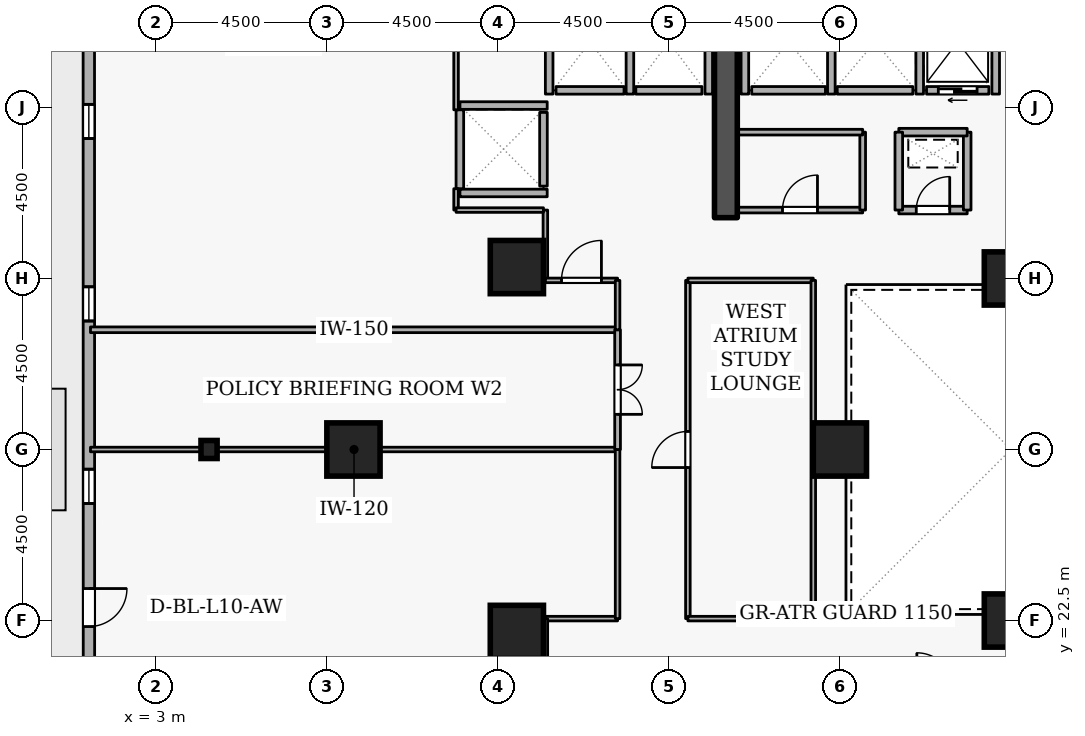
"""IFC4 building model, lengths in metres.
Left out: names, types, materials, properties, quantities, classifications, styles, units other than length and angle.
Written with IfcOpenShell. Run it as: python <this file> out.ifc"""

import sys

from ifc_helpers import new_model, si_unit, direction, frame, frame_2d, origin, origin_2d, place, context, subcontext, project, spatial, rectangle, i_section, extrude, element, fill, save


model = new_model("IFC4")
c1 = context("Model", 3, precision=1e-05, world=origin(), true_north=direction((0.0, 1.0)))
c2 = subcontext(c1, "Body", "Model", "MODEL_VIEW")
j1 = project(units=[si_unit("LENGTHUNIT", "METRE"), si_unit("PLANEANGLEUNIT", "RADIAN")], contexts=[c1])
p1 = place(None, origin())
s1 = spatial("IfcSite", under=j1, at=p1, CompositionType="ELEMENT")
p2 = place(p1, origin())
s2 = spatial("IfcBuilding", under=s1, at=p2, CompositionType="ELEMENT")
p3 = place(p2, frame((0.0, 0.0, 42.3)))
s3 = spatial("IfcBuildingStorey", under=s2, at=p3, CompositionType="ELEMENT", Elevation=42.3)
p4 = place(p3, frame((18.0, 33.1, 0.0), z_axis=(0.0, 0.0, 1.0), x_axis=(0.0, 1.0, 0.0)))
e1 = element("IfcWall", 1, at=p4, inside=s3, PredefinedType="SHEAR", context=c2, shape_type="SweptSolid", body=[
    extrude(rectangle(XDim=5.7, YDim=0.6, at=frame_2d((2.85, 0.0))), origin(), (0.0, 0.0, 1.0), 3.6),
])
for number, where, z_axis, x_axis in (
    (2, (8.2, 27.0, 0.0), (0.0, 0.0, 1.0), (1.0, 0.0, 0.0)),
    (3, (12.5, 22.2, 0.0), (0.0, 0.0, 1.0), (1.0, 0.0, 0.0)),
    (4, (12.5, 31.8, 0.0), (0.0, 0.0, 1.0), (1.0, 0.0, 0.0)),
    (5, (25.5, 22.5, 0.0), (0.0, 0.0, 1.0), (1.0, 0.0, 0.0)),
    (6, (25.5, 31.5, 0.0), (0.0, 0.0, 1.0), (1.0, 0.0, 0.0)),
    (7, (21.0, 27.0, 0.0), (0.0, 0.0, 1.0), (1.0, 0.0, 0.0)),
):
    element("IfcColumn", number, at=place(p3, frame(where, z_axis=z_axis, x_axis=x_axis)), inside=s3, PredefinedType="COLUMN", context=c2, shape_type="SweptSolid", body=[
        extrude(rectangle(XDim=1.4, YDim=1.4, at=origin_2d()), origin(), (0.0, 0.0, 1.0), 3.6),
    ])
p5 = place(p3, frame((4.4, 27.0, 0.0), z_axis=(0.0, 0.0, 1.0), x_axis=(1.0, 0.0, 0.0)))
e8 = element("IfcColumn", 8, at=p5, inside=s3, PredefinedType="COLUMN", context=c2, shape_type="SweptSolid", body=[
    extrude(i_section(OverallWidth=0.424, OverallDepth=0.475, WebThickness=0.048, FlangeThickness=0.077, FilletRadius=0.015, at=origin_2d()), origin(), (0.0, 0.0, 1.0), 3.6),
])
p6 = place(p3, frame((1.235, 42.681, 0.0), z_axis=(0.0, 0.0, 1.0), x_axis=(0.000208784245, -0.999999978205, 0.0)))
e9 = element("IfcWall", 9, at=p6, inside=s3, PredefinedType="STANDARD", context=c2, shape_type="SweptSolid", body=[
    extrude(rectangle(XDim=35.08, YDim=0.3, at=frame_2d((17.54, 0.0))), origin(), (0.0, 0.0, 1.0), 2.7),
])
p7 = place(p6, frame((19.34, 0.0, 0.0)))
e10 = element("IfcOpeningElement", 10, at=p7, cuts=e9, PredefinedType="OPENING", context=c2, shape_type="SweptSolid", body=[
    extrude(rectangle(XDim=1.0, YDim=2.08, at=frame_2d((0.5, 1.04))), frame((0.0, 0.16, 0.0), z_axis=(0.0, -1.0, 0.0), x_axis=(1.0, 0.0, 0.0)), (0.0, 0.0, 1.0), 0.32),
])
p8 = place(p6, frame((1.8, 0.0, 0.72)))
e11 = element("IfcOpeningElement", 11, at=p8, cuts=e9, PredefinedType="OPENING", context=c2, shape_type="SweptSolid", body=[
    extrude(rectangle(XDim=0.9, YDim=1.75, at=frame_2d((0.45, 0.875))), frame((0.0, 0.16, 0.0), z_axis=(0.0, -1.0, 0.0), x_axis=(1.0, 0.0, 0.0)), (0.0, 0.0, 1.0), 0.32),
])
p9 = place(p6, frame((6.6, 0.0, 0.72)))
e12 = element("IfcOpeningElement", 12, at=p9, cuts=e9, PredefinedType="OPENING", context=c2, shape_type="SweptSolid", body=[
    extrude(rectangle(XDim=0.9, YDim=1.75, at=frame_2d((0.45, 0.875))), frame((0.0, 0.16, 0.0), z_axis=(0.0, -1.0, 0.0), x_axis=(1.0, 0.0, 0.0)), (0.0, 0.0, 1.0), 0.32),
])
p10 = place(p6, frame((11.4, 0.0, 0.72)))
e13 = element("IfcOpeningElement", 13, at=p10, cuts=e9, PredefinedType="OPENING", context=c2, shape_type="SweptSolid", body=[
    extrude(rectangle(XDim=0.9, YDim=1.75, at=frame_2d((0.45, 0.875))), frame((0.0, 0.16, 0.0), z_axis=(0.0, -1.0, 0.0), x_axis=(1.0, 0.0, 0.0)), (0.0, 0.0, 1.0), 0.32),
])
p11 = place(p6, frame((16.2, 0.0, 0.72)))
e14 = element("IfcOpeningElement", 14, at=p11, cuts=e9, PredefinedType="OPENING", context=c2, shape_type="SweptSolid", body=[
    extrude(rectangle(XDim=0.9, YDim=1.75, at=frame_2d((0.45, 0.875))), frame((0.0, 0.16, 0.0), z_axis=(0.0, -1.0, 0.0), x_axis=(1.0, 0.0, 0.0)), (0.0, 0.0, 1.0), 0.32),
])
p12 = place(p6, frame((25.8, 0.0, 0.72)))
e15 = element("IfcOpeningElement", 15, at=p12, cuts=e9, PredefinedType="OPENING", context=c2, shape_type="SweptSolid", body=[
    extrude(rectangle(XDim=0.9, YDim=1.75, at=frame_2d((0.45, 0.875))), frame((0.0, 0.16, 0.0), z_axis=(0.0, -1.0, 0.0), x_axis=(1.0, 0.0, 0.0)), (0.0, 0.0, 1.0), 0.32),
])
p13 = place(p3, frame((24.92, 36.45, 0.0), z_axis=(0.0, 0.0, 1.0), x_axis=(-1.0, 0.0, 0.0)))
e16 = element("IfcWall", 16, at=p13, inside=s3, PredefinedType="STANDARD", context=c2, shape_type="SweptSolid", body=[
    extrude(rectangle(XDim=1.64, YDim=0.2, at=frame_2d((0.82, 0.0))), origin(), (0.0, 0.0, 1.0), 3.34),
])
p14 = place(p13, frame((0.31, 0.0, 0.0)))
e17 = element("IfcOpeningElement", 17, at=p14, cuts=e16, PredefinedType="OPENING", context=c2, shape_type="SweptSolid", body=[
    extrude(rectangle(XDim=1.02, YDim=2.06, at=frame_2d((0.51, 1.03))), frame((0.0, 0.11, 0.0), z_axis=(0.0, -1.0, 0.0), x_axis=(1.0, 0.0, 0.0)), (0.0, 0.0, 1.0), 0.22),
])
p15 = place(p3, frame((22.92, 36.45, 0.0), z_axis=(0.0, 0.0, 1.0), x_axis=(-1.0, 0.0, 0.0)))
e18 = element("IfcWall", 18, at=p15, inside=s3, PredefinedType="STANDARD", context=c2, shape_type="SweptSolid", body=[
    extrude(rectangle(XDim=1.99, YDim=0.2, at=frame_2d((0.995, 0.0))), origin(), (0.0, 0.0, 1.0), 3.34),
])
p16 = place(p3, frame((20.62, 36.45, 0.0), z_axis=(0.0, 0.0, 1.0), x_axis=(-1.0, 0.0, 0.0)))
e19 = element("IfcWall", 19, at=p16, inside=s3, PredefinedType="STANDARD", context=c2, shape_type="SweptSolid", body=[
    extrude(rectangle(XDim=1.94, YDim=0.2, at=frame_2d((0.97, 0.0))), origin(), (0.0, 0.0, 1.0), 3.34),
])
p17 = place(p3, frame((17.37, 36.45, 0.0), z_axis=(0.0, 0.0, 1.0), x_axis=(-1.0, 0.0, 0.0)))
e20 = element("IfcWall", 20, at=p17, inside=s3, PredefinedType="STANDARD", context=c2, shape_type="SweptSolid", body=[
    extrude(rectangle(XDim=1.74, YDim=0.2, at=frame_2d((0.87, 0.0))), origin(), (0.0, 0.0, 1.0), 3.34),
])
p18 = place(p3, frame((15.32, 36.45, 0.0), z_axis=(0.0, 0.0, 1.0), x_axis=(-1.0, 0.0, 0.0)))
e21 = element("IfcWall", 21, at=p18, inside=s3, PredefinedType="STANDARD", context=c2, shape_type="SweptSolid", body=[
    extrude(rectangle(XDim=1.79, YDim=0.2, at=frame_2d((0.895, 0.0))), origin(), (0.0, 0.0, 1.0), 3.34),
])
p19 = place(p3, frame((13.2, 33.93, 0.0), z_axis=(0.0, 0.0, 1.0), x_axis=(0.0, 1.0, 0.0)))
e22 = element("IfcWall", 22, at=p19, inside=s3, PredefinedType="STANDARD", context=c2, shape_type="SweptSolid", body=[
    extrude(rectangle(XDim=1.94, YDim=0.2, at=frame_2d((0.97, 0.0))), origin(), (0.0, 0.0, 1.0), 3.34),
])
for number, where, z_axis, x_axis in (
    (23, (25.1, 36.352, 0.0), (0.0, 0.0, 1.0), (0.0, 1.0, 0.0)),
    (24, (23.1, 36.352, 0.0), (0.0, 0.0, 1.0), (0.0, 1.0, 0.0)),
    (25, (20.775, 36.352, 0.0), (0.0, 0.0, 1.0), (0.0, 1.0, 0.0)),
    (26, (18.5, 36.352, 0.0), (0.0, 0.0, 1.0), (0.0, 1.0, 0.0)),
):
    element("IfcWall", number, at=place(p3, frame(where, z_axis=z_axis, x_axis=x_axis)), inside=s3, PredefinedType="STANDARD", context=c2, shape_type="SweptSolid", body=[
        extrude(rectangle(XDim=2.436, YDim=0.2, at=frame_2d((1.218, 0.0))), origin(), (0.0, 0.0, 1.0), 3.34),
    ])
p20 = place(p3, frame((17.55, 36.352, 0.0), z_axis=(0.0, 0.0, 1.0), x_axis=(0.0, 1.0, 0.0)))
e27 = element("IfcWall", 27, at=p20, inside=s3, PredefinedType="STANDARD", context=c2, shape_type="SweptSolid", body=[
    extrude(rectangle(XDim=2.636, YDim=0.2, at=frame_2d((1.318, 0.0))), origin(), (0.0, 0.0, 1.0), 2.545),
])
for number, where, z_axis, x_axis in (
    (28, (15.475, 36.352, 0.0), (0.0, 0.0, 1.0), (0.0, 1.0, 0.0)),
    (29, (13.35, 36.352, 0.0), (0.0, 0.0, 1.0), (0.0, 1.0, 0.0)),
):
    element("IfcWall", number, at=place(p3, frame(where, z_axis=z_axis, x_axis=x_axis)), inside=s3, PredefinedType="STANDARD", context=c2, shape_type="SweptSolid", body=[
        extrude(rectangle(XDim=2.636, YDim=0.2, at=frame_2d((1.318, 0.0))), origin(), (0.0, 0.0, 1.0), 3.34),
    ])
for number, where, z_axis, x_axis in (
    (30, (11.002, 36.05, 0.0), (0.0, 0.0, 1.0), (1.0, 0.0, 0.0)),
    (31, (11.002, 33.75, 0.0), (0.0, 0.0, 1.0), (1.0, 0.0, 0.0)),
):
    element("IfcWall", number, at=place(p3, frame(where, z_axis=z_axis, x_axis=x_axis)), inside=s3, PredefinedType="STANDARD", context=c2, shape_type="SweptSolid", body=[
        extrude(rectangle(XDim=2.296, YDim=0.2, at=frame_2d((1.148, 0.0))), origin(), (0.0, 0.0, 1.0), 3.34),
    ])
p21 = place(p3, frame((11.0, 33.862, 0.0), z_axis=(0.0, 0.0, 1.0), x_axis=(0.0, 1.0, 0.0)))
e32 = element("IfcWall", 32, at=p21, inside=s3, PredefinedType="STANDARD", context=c2, shape_type="SweptSolid", body=[
    extrude(rectangle(XDim=2.076, YDim=0.2, at=frame_2d((1.038, 0.0))), origin(), (0.0, 0.0, 1.0), 3.34),
])
p22 = place(p3, frame((22.55, 33.3, 0.0), z_axis=(0.0, 0.0, 1.0), x_axis=(1.0, 0.0, 0.0)))
e33 = element("IfcWall", 33, at=p22, inside=s3, PredefinedType="STANDARD", context=c2, shape_type="SweptSolid", body=[
    extrude(rectangle(XDim=1.8, YDim=0.2, at=frame_2d((0.9, 0.0))), origin(), (0.0, 0.0, 1.0), 3.34),
])
p23 = place(p22, frame((0.46, 0.0, 0.0)))
e34 = element("IfcOpeningElement", 34, at=p23, cuts=e33, PredefinedType="OPENING", context=c2, shape_type="SweptSolid", body=[
    extrude(rectangle(XDim=0.88, YDim=2.04, at=frame_2d((0.44, 1.02))), frame((0.0, 0.11, 0.0), z_axis=(0.0, -1.0, 0.0), x_axis=(1.0, 0.0, 0.0)), (0.0, 0.0, 1.0), 0.22),
])
p24 = place(p3, frame((24.35, 33.3, 0.0), z_axis=(0.0, 0.0, 1.0), x_axis=(0.0, 1.0, 0.0)))
e35 = element("IfcWall", 35, at=p24, inside=s3, PredefinedType="STANDARD", context=c2, shape_type="SweptSolid", body=[
    extrude(rectangle(XDim=2.05, YDim=0.2, at=frame_2d((1.025, 0.0))), origin(), (0.0, 0.0, 1.0), 3.34),
])
p25 = place(p3, frame((24.35, 35.35, 0.0), z_axis=(0.0, 0.0, 1.0), x_axis=(-1.0, 0.0, 0.0)))
e36 = element("IfcWall", 36, at=p25, inside=s3, PredefinedType="STANDARD", context=c2, shape_type="SweptSolid", body=[
    extrude(rectangle(XDim=1.8, YDim=0.2, at=frame_2d((0.9, 0.0))), origin(), (0.0, 0.0, 1.0), 3.34),
])
p26 = place(p3, frame((22.55, 35.35, 0.0), z_axis=(0.0, 0.0, 1.0), x_axis=(0.0, -1.0, 0.0)))
e37 = element("IfcWall", 37, at=p26, inside=s3, PredefinedType="STANDARD", context=c2, shape_type="SweptSolid", body=[
    extrude(rectangle(XDim=2.05, YDim=0.2, at=frame_2d((1.025, 0.0))), origin(), (0.0, 0.0, 1.0), 3.34),
])
p27 = place(p3, frame((18.3, 33.3, 0.0), z_axis=(0.0, 0.0, 1.0), x_axis=(1.0, 0.0, 0.0)))
e38 = element("IfcWall", 38, at=p27, inside=s3, PredefinedType="PARTITIONING", context=c2, shape_type="SweptSolid", body=[
    extrude(rectangle(XDim=3.3, YDim=0.15, at=frame_2d((1.65, 0.0))), origin(), (0.0, 0.0, 1.0), 3.34),
])
p28 = place(p27, frame((1.19, 0.0, 0.0)))
e39 = element("IfcOpeningElement", 39, at=p28, cuts=e38, PredefinedType="OPENING", context=c2, shape_type="SweptSolid", body=[
    extrude(rectangle(XDim=0.92, YDim=2.08, at=frame_2d((0.46, 1.04))), frame((0.0, 0.085, 0.0), z_axis=(0.0, -1.0, 0.0), x_axis=(1.0, 0.0, 0.0)), (0.0, 0.0, 1.0), 0.17),
])
p29 = place(p3, frame((21.6, 33.3, 0.0), z_axis=(0.0, 0.0, 1.0), x_axis=(0.0, 1.0, 0.0)))
e40 = element("IfcWall", 40, at=p29, inside=s3, PredefinedType="PARTITIONING", context=c2, shape_type="SweptSolid", body=[
    extrude(rectangle(XDim=2.05, YDim=0.15, at=frame_2d((1.025, 0.0))), origin(), (0.0, 0.0, 1.0), 3.34),
])
p30 = place(p3, frame((21.6, 35.35, 0.0), z_axis=(0.0, 0.0, 1.0), x_axis=(-1.0, 0.0, 0.0)))
e41 = element("IfcWall", 41, at=p30, inside=s3, PredefinedType="PARTITIONING", context=c2, shape_type="SweptSolid", body=[
    extrude(rectangle(XDim=3.3, YDim=0.15, at=frame_2d((1.65, 0.0))), origin(), (0.0, 0.0, 1.0), 3.34),
])
p31 = place(p3, frame((15.15, 22.55, 0.0), z_axis=(0.0, 0.0, 1.0), x_axis=(-1.0, 0.0, 0.0)))
e42 = element("IfcWall", 42, at=p31, inside=s3, PredefinedType="PARTITIONING", context=c2, shape_type="SweptSolid", body=[
    extrude(rectangle(XDim=1.9, YDim=0.12, at=frame_2d((0.95, 0.0))), origin(), (0.0, 0.0, 1.0), 3.34),
])
p32 = place(p3, frame((13.25, 22.55, 0.0), z_axis=(0.0, 0.0, 1.0), x_axis=(0.0, -1.0, 0.0)))
e43 = element("IfcWall", 43, at=p32, inside=s3, PredefinedType="PARTITIONING", context=c2, shape_type="SweptSolid", body=[
    extrude(rectangle(XDim=1.85, YDim=0.12, at=frame_2d((0.925, 0.0))), origin(), (0.0, 0.0, 1.0), 3.34),
])
p33 = place(p3, frame((1.28, 27.0, 0.0), z_axis=(0.0, 0.0, 1.0), x_axis=(1.0, 0.0, 0.0)))
e44 = element("IfcWall", 44, at=p33, inside=s3, PredefinedType="PARTITIONING", context=c2, shape_type="SweptSolid", body=[
    extrude(rectangle(XDim=13.87, YDim=0.12, at=frame_2d((6.935, 0.0))), origin(), (0.0, 0.0, 1.0), 2.882),
])
p34 = place(p3, frame((15.15, 27.0, 0.0), z_axis=(0.0, 0.0, 1.0), x_axis=(0.0, -1.0, 0.0)))
e45 = element("IfcWall", 45, at=p34, inside=s3, PredefinedType="PARTITIONING", context=c2, shape_type="SweptSolid", body=[
    extrude(rectangle(XDim=4.45, YDim=0.12, at=frame_2d((2.225, 0.0))), origin(), (0.0, 0.0, 1.0), 3.34),
])
p35 = place(p3, frame((1.28, 30.15, 0.0), z_axis=(0.0, 0.0, 1.0), x_axis=(1.0, 0.0, 0.0)))
e46 = element("IfcWall", 46, at=p35, inside=s3, PredefinedType="PARTITIONING", context=c2, shape_type="SweptSolid", body=[
    extrude(rectangle(XDim=13.87, YDim=0.15, at=frame_2d((6.935, 0.0))), origin(), (0.0, 0.0, 1.0), 3.34),
])
p36 = place(p3, frame((15.15, 30.15, 0.0), z_axis=(0.0, 0.0, 1.0), x_axis=(0.0, -1.0, 0.0)))
e47 = element("IfcWall", 47, at=p36, inside=s3, PredefinedType="PARTITIONING", context=c2, shape_type="SweptSolid", body=[
    extrude(rectangle(XDim=3.15, YDim=0.15, at=frame_2d((1.575, 0.0))), origin(), (0.0, 0.0, 1.0), 3.34),
])
p37 = place(p36, frame((0.925, 0.0, 0.0)))
e48 = element("IfcOpeningElement", 48, at=p37, cuts=e47, PredefinedType="OPENING", context=c2, shape_type="SweptSolid", body=[
    extrude(rectangle(XDim=1.3, YDim=2.12, at=frame_2d((0.65, 1.06))), frame((0.0, 0.085, 0.0), z_axis=(0.0, -1.0, 0.0), x_axis=(1.0, 0.0, 0.0)), (0.0, 0.0, 1.0), 0.17),
])
p38 = place(p3, frame((13.25, 33.3, 0.0), z_axis=(0.0, 0.0, 1.0), x_axis=(0.0, -1.0, 0.0)))
e49 = element("IfcWall", 49, at=p38, inside=s3, PredefinedType="PARTITIONING", context=c2, shape_type="SweptSolid", body=[
    extrude(rectangle(XDim=1.85, YDim=0.12, at=frame_2d((0.925, 0.0))), origin(), (0.0, 0.0, 1.0), 3.34),
])
p39 = place(p3, frame((13.25, 31.45, 0.0), z_axis=(0.0, 0.0, 1.0), x_axis=(1.0, 0.0, 0.0)))
e50 = element("IfcWall", 50, at=p39, inside=s3, PredefinedType="PARTITIONING", context=c2, shape_type="SweptSolid", body=[
    extrude(rectangle(XDim=1.9, YDim=0.12, at=frame_2d((0.95, 0.0))), origin(), (0.0, 0.0, 1.0), 3.34),
])
p40 = place(p39, frame((0.425, 0.0, 0.0)))
e51 = element("IfcOpeningElement", 51, at=p40, cuts=e50, PredefinedType="OPENING", context=c2, shape_type="SweptSolid", body=[
    extrude(rectangle(XDim=1.05, YDim=2.1, at=frame_2d((0.525, 1.05))), frame((0.0, 0.07, 0.0), z_axis=(0.0, -1.0, 0.0), x_axis=(1.0, 0.0, 0.0)), (0.0, 0.0, 1.0), 0.14),
])
p41 = place(p3, frame((15.15, 31.45, 0.0), z_axis=(0.0, 0.0, 1.0), x_axis=(0.0, -1.0, 0.0)))
e52 = element("IfcWall", 52, at=p41, inside=s3, PredefinedType="PARTITIONING", context=c2, shape_type="SweptSolid", body=[
    extrude(rectangle(XDim=1.3, YDim=0.12, at=frame_2d((0.65, 0.0))), origin(), (0.0, 0.0, 1.0), 3.34),
])
p42 = place(p3, frame((10.9, 45.22, 0.0), z_axis=(0.0, 0.0, 1.0), x_axis=(0.0, -1.0, 0.0)))
e53 = element("IfcWall", 53, at=p42, inside=s3, PredefinedType="PARTITIONING", context=c2, shape_type="SweptSolid", body=[
    extrude(rectangle(XDim=9.282, YDim=0.12, at=frame_2d((4.641, 0.0))), origin(), (0.0, 0.0, 1.0), 3.34),
])
p43 = place(p3, frame((10.9, 33.862, 0.0), z_axis=(0.0, 0.0, 1.0), x_axis=(0.0, -1.0, 0.0)))
e54 = element("IfcWall", 54, at=p43, inside=s3, PredefinedType="PARTITIONING", context=c2, shape_type="SweptSolid", body=[
    extrude(rectangle(XDim=0.562, YDim=0.12, at=frame_2d((0.281, 0.0))), origin(), (0.0, 0.0, 1.0), 3.34),
])
p44 = place(p3, frame((10.9, 33.3, 0.0), z_axis=(0.0, 0.0, 1.0), x_axis=(1.0, 0.0, 0.0)))
e55 = element("IfcWall", 55, at=p44, inside=s3, PredefinedType="PARTITIONING", context=c2, shape_type="SweptSolid", body=[
    extrude(rectangle(XDim=2.3, YDim=0.12, at=frame_2d((1.15, 0.0))), origin(), (0.0, 0.0, 1.0), 3.34),
])
p45 = place(p3, frame((17.0, 22.55, 0.0), z_axis=(0.0, 0.0, 1.0), x_axis=(0.0, 1.0, 0.0)))
e56 = element("IfcWall", 56, at=p45, inside=s3, PredefinedType="PARTITIONING", context=c2, shape_type="SweptSolid", body=[
    extrude(rectangle(XDim=8.9, YDim=0.12, at=frame_2d((4.45, 0.0))), origin(), (0.0, 0.0, 1.0), 3.34),
])
p46 = place(p45, frame((3.975, 0.0, 0.0)))
e57 = element("IfcOpeningElement", 57, at=p46, cuts=e56, PredefinedType="OPENING", context=c2, shape_type="SweptSolid", body=[
    extrude(rectangle(XDim=0.95, YDim=2.1, at=frame_2d((0.475, 1.05))), frame((0.0, 0.07, 0.0), z_axis=(0.0, -1.0, 0.0), x_axis=(1.0, 0.0, 0.0)), (0.0, 0.0, 1.0), 0.14),
])
p47 = place(p3, frame((17.0, 31.45, 0.0), z_axis=(0.0, 0.0, 1.0), x_axis=(1.0, 0.0, 0.0)))
e58 = element("IfcWall", 58, at=p47, inside=s3, PredefinedType="PARTITIONING", context=c2, shape_type="SweptSolid", body=[
    extrude(rectangle(XDim=3.3, YDim=0.12, at=frame_2d((1.65, 0.0))), origin(), (0.0, 0.0, 1.0), 3.34),
])
p48 = place(p3, frame((20.3, 31.45, 0.0), z_axis=(0.0, 0.0, 1.0), x_axis=(0.0, -1.0, 0.0)))
e59 = element("IfcWall", 59, at=p48, inside=s3, PredefinedType="PARTITIONING", context=c2, shape_type="SweptSolid", body=[
    extrude(rectangle(XDim=8.9, YDim=0.12, at=frame_2d((4.45, 0.0))), origin(), (0.0, 0.0, 1.0), 3.34),
])
p49 = place(p3, frame((20.3, 22.55, 0.0), z_axis=(0.0, 0.0, 1.0), x_axis=(-1.0, 0.0, 0.0)))
e60 = element("IfcWall", 60, at=p49, inside=s3, PredefinedType="PARTITIONING", context=c2, shape_type="SweptSolid", body=[
    extrude(rectangle(XDim=3.3, YDim=0.12, at=frame_2d((1.65, 0.0))), origin(), (0.0, 0.0, 1.0), 3.34),
])
p50 = place(p7, origin())
e61 = element("IfcDoor", 61, at=p50, inside=s3, OperationType="SINGLE_SWING_LEFT", PredefinedType="DOOR", context=c2, shape_type="SweptSolid", body=[
    extrude(rectangle(XDim=1.0, YDim=2.08, at=frame_2d((0.5, 1.04))), frame((0.0, 0.025, 0.0), z_axis=(0.0, -1.0, 0.0), x_axis=(1.0, 0.0, 0.0)), (0.0, 0.0, 1.0), 0.05),
])
fill(e10, e61)
p51 = place(p9, origin())
e62 = element("IfcWindow", 62, at=p51, inside=s3, PartitioningType="SINGLE_PANEL", PredefinedType="WINDOW", context=c2, shape_type="SweptSolid", body=[
    extrude(rectangle(XDim=0.9, YDim=1.75, at=frame_2d((0.45, 0.875))), frame((0.0, 0.03, 0.0), z_axis=(0.0, -1.0, 0.0), x_axis=(1.0, 0.0, 0.0)), (0.0, 0.0, 1.0), 0.06),
])
fill(e12, e62)
p52 = place(p10, origin())
e63 = element("IfcWindow", 63, at=p52, inside=s3, PartitioningType="SINGLE_PANEL", PredefinedType="WINDOW", context=c2, shape_type="SweptSolid", body=[
    extrude(rectangle(XDim=0.9, YDim=1.75, at=frame_2d((0.45, 0.875))), frame((0.0, 0.03, 0.0), z_axis=(0.0, -1.0, 0.0), x_axis=(1.0, 0.0, 0.0)), (0.0, 0.0, 1.0), 0.06),
])
fill(e13, e63)
p53 = place(p11, origin())
e64 = element("IfcWindow", 64, at=p53, inside=s3, PartitioningType="SINGLE_PANEL", PredefinedType="WINDOW", context=c2, shape_type="SweptSolid", body=[
    extrude(rectangle(XDim=0.9, YDim=1.75, at=frame_2d((0.45, 0.875))), frame((0.0, 0.03, 0.0), z_axis=(0.0, -1.0, 0.0), x_axis=(1.0, 0.0, 0.0)), (0.0, 0.0, 1.0), 0.06),
])
fill(e14, e64)
p54 = place(p14, origin())
e65 = element("IfcDoor", 65, at=p54, inside=s3, OperationType="SLIDING_TO_LEFT", PredefinedType="DOOR", context=c2, shape_type="SweptSolid", body=[
    extrude(rectangle(XDim=1.02, YDim=2.06, at=frame_2d((0.51, 1.03))), frame((0.0, 0.025, 0.0), z_axis=(0.0, -1.0, 0.0), x_axis=(1.0, 0.0, 0.0)), (0.0, 0.0, 1.0), 0.05),
])
fill(e17, e65)
p55 = place(p23, origin())
e66 = element("IfcDoor", 66, at=p55, inside=s3, OperationType="SINGLE_SWING_RIGHT", PredefinedType="DOOR", context=c2, shape_type="SweptSolid", body=[
    extrude(rectangle(XDim=0.88, YDim=2.04, at=frame_2d((0.44, 1.02))), frame((0.0, 0.025, 0.0), z_axis=(0.0, -1.0, 0.0), x_axis=(1.0, 0.0, 0.0)), (0.0, 0.0, 1.0), 0.05),
])
fill(e34, e66)
p56 = place(p28, origin())
e67 = element("IfcDoor", 67, at=p56, inside=s3, OperationType="SINGLE_SWING_RIGHT", PredefinedType="DOOR", context=c2, shape_type="SweptSolid", body=[
    extrude(rectangle(XDim=0.92, YDim=2.08, at=frame_2d((0.46, 1.04))), frame((0.0, 0.025, 0.0), z_axis=(0.0, -1.0, 0.0), x_axis=(1.0, 0.0, 0.0)), (0.0, 0.0, 1.0), 0.05),
])
fill(e39, e67)
p57 = place(p37, origin())
e68 = element("IfcDoor", 68, at=p57, inside=s3, OperationType="DOUBLE_DOOR_SINGLE_SWING", PredefinedType="DOOR", context=c2, shape_type="SweptSolid", body=[
    extrude(rectangle(XDim=1.3, YDim=2.12, at=frame_2d((0.65, 1.06))), frame((0.0, 0.025, 0.0), z_axis=(0.0, -1.0, 0.0), x_axis=(1.0, 0.0, 0.0)), (0.0, 0.0, 1.0), 0.05),
])
fill(e48, e68)
p58 = place(p40, origin())
e69 = element("IfcDoor", 69, at=p58, inside=s3, OperationType="SINGLE_SWING_RIGHT", PredefinedType="DOOR", context=c2, shape_type="SweptSolid", body=[
    extrude(rectangle(XDim=1.05, YDim=2.1, at=frame_2d((0.525, 1.05))), frame((0.0, 0.025, 0.0), z_axis=(0.0, -1.0, 0.0), x_axis=(1.0, 0.0, 0.0)), (0.0, 0.0, 1.0), 0.05),
])
fill(e51, e69)
p59 = place(p46, origin())
e70 = element("IfcDoor", 70, at=p59, inside=s3, OperationType="SINGLE_SWING_LEFT", PredefinedType="DOOR", context=c2, shape_type="SweptSolid", body=[
    extrude(rectangle(XDim=0.95, YDim=2.1, at=frame_2d((0.475, 1.05))), frame((0.0, 0.025, 0.0), z_axis=(0.0, -1.0, 0.0), x_axis=(1.0, 0.0, 0.0)), (0.0, 0.0, 1.0), 0.05),
])
fill(e57, e70)
save(model, sys.argv[1])
